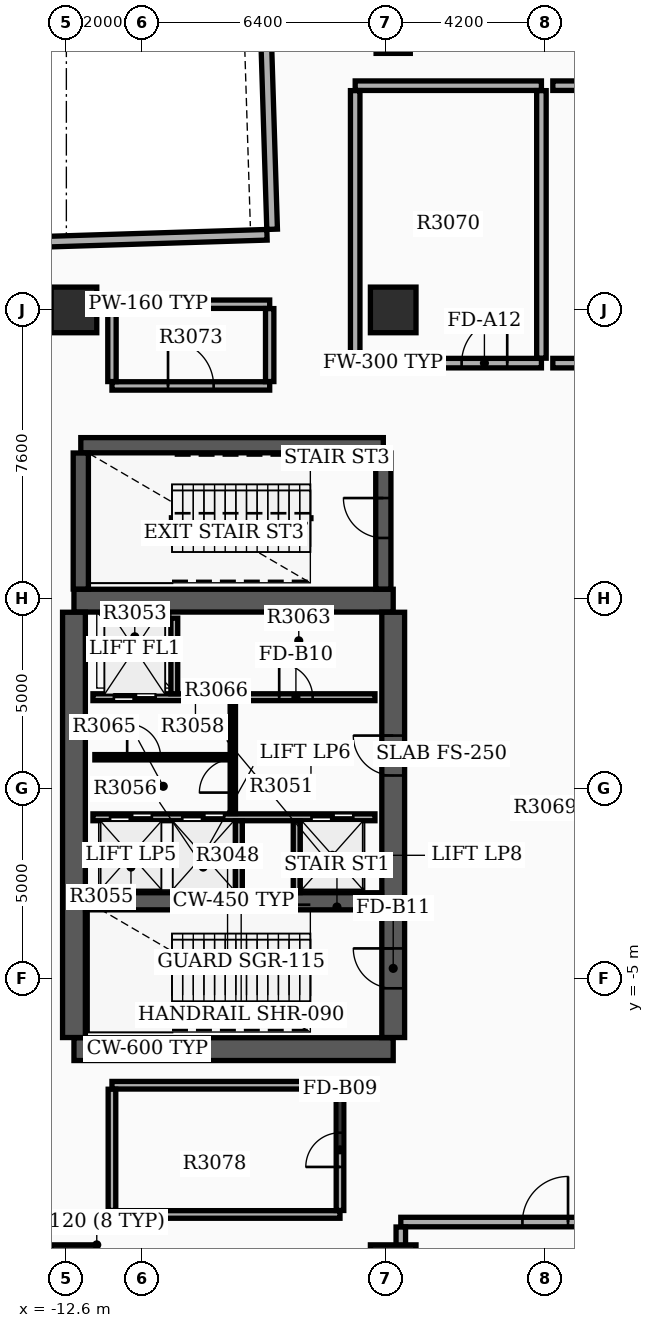
"""IFC4 building model, lengths in metres.
Left out: names, types, materials, properties, quantities, classifications, styles, units other than length and angle.
Written with IfcOpenShell. Run it as: python <this file> out.ifc"""

import sys

from ifc_helpers import new_model, si_unit, direction, frame, frame_2d, origin, origin_2d, place, context, subcontext, project, spatial, rectangle, extrude, element, fill, save


model = new_model("IFC4")
c1 = context("Model", 3, precision=1e-05, world=origin(), true_north=direction((0.0, 1.0)))
c2 = subcontext(c1, "Body", "Model", "MODEL_VIEW")
j1 = project(units=[si_unit("LENGTHUNIT", "METRE"), si_unit("PLANEANGLEUNIT", "RADIAN")], contexts=[c1])
p1 = place(None, origin())
s1 = spatial("IfcSite", under=j1, at=p1, CompositionType="ELEMENT")
p2 = place(p1, origin())
s2 = spatial("IfcBuilding", under=s1, at=p2, CompositionType="ELEMENT")
p3 = place(p2, frame((0.0, 0.0, 191.7)))
s3 = spatial("IfcBuildingStorey", under=s2, at=p3, CompositionType="ELEMENT", Elevation=191.7)
for number, where, z_axis, x_axis in (
    (1, (-12.4, -6.85, 0.0), (0.0, 0.0, 1.0), (1.0, 0.0, 0.0)),
    (2, (-12.4, 4.95, 0.0), (0.0, 0.0, 1.0), (1.0, 0.0, 0.0)),
):
    element("IfcWall", number, at=place(p3, frame(where, z_axis=z_axis, x_axis=x_axis)), inside=s3, PredefinedType="SHEAR", context=c2, shape_type="SweptSolid", body=[
        extrude(rectangle(XDim=8.4, YDim=0.6, at=frame_2d((4.2, 0.0))), origin(), (0.0, 0.0, 1.0), 4.85),
    ])
p4 = place(p3, frame((-12.4, -6.545, 0.0), z_axis=(0.0, 0.0, 1.0), x_axis=(0.0, 1.0, 0.0)))
e3 = element("IfcWall", 3, at=p4, inside=s3, PredefinedType="SHEAR", context=c2, shape_type="SweptSolid", body=[
    extrude(rectangle(XDim=11.19, YDim=0.6, at=frame_2d((5.595, 0.0))), origin(), (0.0, 0.0, 1.0), 4.85),
])
p5 = place(p3, frame((-4.0, -6.545, 0.0), z_axis=(0.0, 0.0, 1.0), x_axis=(0.0, 1.0, 0.0)))
e4 = element("IfcWall", 4, at=p5, inside=s3, PredefinedType="SHEAR", context=c2, shape_type="SweptSolid", body=[
    extrude(rectangle(XDim=11.19, YDim=0.6, at=frame_2d((5.595, 0.0))), origin(), (0.0, 0.0, 1.0), 4.85),
])
p6 = place(p5, frame((1.295, 0.0, 0.0)))
e5 = element("IfcOpeningElement", 5, at=p6, cuts=e4, PredefinedType="OPENING", context=c2, shape_type="SweptSolid", body=[
    extrude(rectangle(XDim=1.05, YDim=2.15, at=frame_2d((0.525, 1.075))), frame((0.0, 0.31, 0.0), z_axis=(0.0, -1.0, 0.0), x_axis=(1.0, 0.0, 0.0)), (0.0, 0.0, 1.0), 0.62),
])
p7 = place(p5, frame((6.895, 0.0, 0.0)))
e6 = element("IfcOpeningElement", 6, at=p7, cuts=e4, PredefinedType="OPENING", context=c2, shape_type="SweptSolid", body=[
    extrude(rectangle(XDim=1.05, YDim=2.15, at=frame_2d((0.525, 1.075))), frame((0.0, 0.31, 0.0), z_axis=(0.0, -1.0, 0.0), x_axis=(1.0, 0.0, 0.0)), (0.0, 0.0, 1.0), 0.62),
])
p8 = place(p3, frame((-12.095, -2.96, 0.0), z_axis=(0.0, 0.0, 1.0), x_axis=(1.0, 0.0, 0.0)))
e7 = element("IfcWall", 7, at=p8, inside=s3, PredefinedType="SHEAR", context=c2, shape_type="SweptSolid", body=[
    extrude(rectangle(XDim=7.79, YDim=0.45, at=frame_2d((3.895, 0.0))), origin(), (0.0, 0.0, 1.0), 4.85),
])
p9 = place(p3, frame((-12.22, 9.04, 0.0), z_axis=(0.0, 0.0, 1.0), x_axis=(1.0, 0.0, 0.0)))
e8 = element("IfcWall", 8, at=p9, inside=s3, PredefinedType="SHEAR", context=c2, shape_type="SweptSolid", body=[
    extrude(rectangle(XDim=7.96, YDim=0.4, at=frame_2d((3.98, 0.0))), origin(), (0.0, 0.0, 1.0), 4.85),
])
p10 = place(p3, frame((-12.22, 5.255, 0.0), z_axis=(0.0, 0.0, 1.0), x_axis=(0.0, 1.0, 0.0)))
e9 = element("IfcWall", 9, at=p10, inside=s3, PredefinedType="SHEAR", context=c2, shape_type="SweptSolid", body=[
    extrude(rectangle(XDim=3.58, YDim=0.4, at=frame_2d((1.79, 0.0))), origin(), (0.0, 0.0, 1.0), 4.85),
])
p11 = place(p3, frame((-4.26, 5.255, 0.0), z_axis=(0.0, 0.0, 1.0), x_axis=(0.0, 1.0, 0.0)))
e10 = element("IfcWall", 10, at=p11, inside=s3, PredefinedType="SHEAR", context=c2, shape_type="SweptSolid", body=[
    extrude(rectangle(XDim=3.58, YDim=0.4, at=frame_2d((1.79, 0.0))), origin(), (0.0, 0.0, 1.0), 4.85),
])
p12 = place(p11, frame((1.345, 0.0, 0.0)))
e11 = element("IfcOpeningElement", 11, at=p12, cuts=e10, PredefinedType="OPENING", context=c2, shape_type="SweptSolid", body=[
    extrude(rectangle(XDim=1.05, YDim=2.15, at=frame_2d((0.525, 1.075))), frame((0.0, 0.21, 0.0), z_axis=(0.0, -1.0, 0.0), x_axis=(1.0, 0.0, 0.0)), (0.0, 0.0, 1.0), 0.42),
])
for number, where, z_axis, x_axis in (
    (12, (-12.4, -12.6, 0.0), (0.0, 0.0, 1.0), (1.0, 0.0, 0.0)),
    (13, (-12.4, 12.6, 0.0), (0.0, 0.0, 1.0), (1.0, 0.0, 0.0)),
    (14, (-4.0, -12.6, 0.0), (0.0, 0.0, 1.0), (1.0, 0.0, 0.0)),
    (15, (-4.0, 12.6, 0.0), (0.0, 0.0, 1.0), (1.0, 0.0, 0.0)),
):
    element("IfcColumn", number, at=place(p3, frame(where, z_axis=z_axis, x_axis=x_axis)), inside=s3, PredefinedType="COLUMN", context=c2, shape_type="SweptSolid", body=[
        extrude(rectangle(XDim=1.2, YDim=1.2, at=origin_2d()), origin(), (0.0, 0.0, 1.0), 5.1),
    ])
p13 = place(p3, frame((-4.0, 19.8, 0.0), z_axis=(0.0, 0.0, 1.0), x_axis=(1.0, 0.0, 0.0)))
e16 = element("IfcColumn", 16, at=p13, inside=s3, PredefinedType="COLUMN", context=c2, shape_type="SweptSolid", body=[
    extrude(rectangle(XDim=0.9, YDim=0.9, at=origin_2d()), origin(), (0.0, 0.0, 1.0), 5.1),
])
p14 = place(p3, frame((-7.817, 34.812, 0.0), z_axis=(0.0, 0.0, 1.0), x_axis=(0.031410322165, -0.999506574096, 0.0)))
e17 = element("IfcWall", 17, at=p14, inside=s3, PredefinedType="STANDARD", context=c2, shape_type="SweptSolid", body=[
    extrude(rectangle(XDim=20.1, YDim=0.28, at=frame_2d((10.05, 0.0))), origin(), (0.0, 0.0, 1.0), 3.93),
])
p15 = place(p14, frame((0.85, 0.0, 0.95)))
e18 = element("IfcOpeningElement", 18, at=p15, cuts=e17, PredefinedType="OPENING", context=c2, shape_type="SweptSolid", body=[
    extrude(rectangle(XDim=1.1, YDim=1.2, at=frame_2d((0.55, 0.6))), frame((0.0, 0.15, 0.0), z_axis=(0.0, -1.0, 0.0), x_axis=(1.0, 0.0, 0.0)), (0.0, 0.0, 1.0), 0.3),
])
p16 = place(p3, frame((-13.618, 14.379, 0.0), z_axis=(0.0, 0.0, 1.0), x_axis=(0.999507224741, 0.031389611199, 0.0)))
e19 = element("IfcWall", 19, at=p16, inside=s3, PredefinedType="STANDARD", context=c2, shape_type="SweptSolid", body=[
    extrude(rectangle(XDim=6.3, YDim=0.28, at=frame_2d((3.15, 0.0))), origin(), (0.0, 0.0, 1.0), 3.93),
])
p17 = place(p3, frame((-11.9, 2.41, 0.0), z_axis=(0.0, 0.0, 1.0), x_axis=(1.0, 0.0, 0.0)))
e20 = element("IfcWall", 20, at=p17, inside=s3, PredefinedType="SOLIDWALL", context=c2, shape_type="SweptSolid", body=[
    extrude(rectangle(XDim=7.42, YDim=0.18, at=frame_2d((3.71, 0.0))), origin(), (0.0, 0.0, 1.0), 3.92),
])
p18 = place(p17, frame((0.55, 0.0, 0.0)))
e21 = element("IfcOpeningElement", 21, at=p18, cuts=e20, PredefinedType="OPENING", context=c2, shape_type="SweptSolid", body=[
    extrude(rectangle(XDim=1.1, YDim=2.15, at=frame_2d((0.55, 1.075))), frame((0.0, 0.1, 0.0), z_axis=(0.0, -1.0, 0.0), x_axis=(1.0, 0.0, 0.0)), (0.0, 0.0, 1.0), 0.2),
])
p19 = place(p17, frame((4.9, 0.0, 0.0)))
e22 = element("IfcOpeningElement", 22, at=p19, cuts=e20, PredefinedType="OPENING", context=c2, shape_type="SweptSolid", body=[
    extrude(rectangle(XDim=0.88, YDim=2.1, at=frame_2d((0.44, 1.05))), frame((0.0, 0.1, 0.0), z_axis=(0.0, -1.0, 0.0), x_axis=(1.0, 0.0, 0.0)), (0.0, 0.0, 1.0), 0.2),
])
p20 = place(p3, frame((-11.9, -0.75, 0.0), z_axis=(0.0, 0.0, 1.0), x_axis=(1.0, 0.0, 0.0)))
e23 = element("IfcWall", 23, at=p20, inside=s3, PredefinedType="SOLIDWALL", context=c2, shape_type="SweptSolid", body=[
    extrude(rectangle(XDim=7.42, YDim=0.18, at=frame_2d((3.71, 0.0))), origin(), (0.0, 0.0, 1.0), 3.92),
])
p21 = place(p20, frame((0.45, 0.0, 0.0)))
e24 = element("IfcOpeningElement", 24, at=p21, cuts=e23, PredefinedType="OPENING", context=c2, shape_type="SweptSolid", body=[
    extrude(rectangle(XDim=1.1, YDim=2.15, at=frame_2d((0.55, 1.075))), frame((0.0, 0.1, 0.0), z_axis=(0.0, -1.0, 0.0), x_axis=(1.0, 0.0, 0.0)), (0.0, 0.0, 1.0), 0.2),
])
p22 = place(p20, frame((2.35, 0.0, 0.0)))
e25 = element("IfcOpeningElement", 25, at=p22, cuts=e23, PredefinedType="OPENING", context=c2, shape_type="SweptSolid", body=[
    extrude(rectangle(XDim=1.1, YDim=2.15, at=frame_2d((0.55, 1.075))), frame((0.0, 0.1, 0.0), z_axis=(0.0, -1.0, 0.0), x_axis=(1.0, 0.0, 0.0)), (0.0, 0.0, 1.0), 0.2),
])
p23 = place(p20, frame((5.75, 0.0, 0.0)))
e26 = element("IfcOpeningElement", 26, at=p23, cuts=e23, PredefinedType="OPENING", context=c2, shape_type="SweptSolid", body=[
    extrude(rectangle(XDim=1.1, YDim=2.15, at=frame_2d((0.55, 1.075))), frame((0.0, 0.1, 0.0), z_axis=(0.0, -1.0, 0.0), x_axis=(1.0, 0.0, 0.0)), (0.0, 0.0, 1.0), 0.2),
])
p24 = place(p3, frame((-9.76, 2.5, 0.0), z_axis=(0.0, 0.0, 1.0), x_axis=(0.0, 1.0, 0.0)))
e27 = element("IfcWall", 27, at=p24, inside=s3, PredefinedType="SOLIDWALL", context=c2, shape_type="SweptSolid", body=[
    extrude(rectangle(XDim=1.99, YDim=0.18, at=frame_2d((0.995, 0.0))), origin(), (0.0, 0.0, 1.0), 3.92),
])
for number, where, z_axis, x_axis in (
    (28, (-8.06, -2.73, 0.0), (0.0, 0.0, 1.0), (0.0, 1.0, 0.0)),
    (29, (-6.54, -2.73, 0.0), (0.0, 0.0, 1.0), (0.0, 1.0, 0.0)),
):
    element("IfcWall", number, at=place(p3, frame(where, z_axis=z_axis, x_axis=x_axis)), inside=s3, PredefinedType="SOLIDWALL", context=c2, shape_type="SweptSolid", body=[
        extrude(rectangle(XDim=1.89, YDim=0.18, at=frame_2d((0.945, 0.0))), origin(), (0.0, 0.0, 1.0), 3.92),
    ])
p25 = place(p3, frame((-8.22, -0.65, 0.0), z_axis=(0.0, 0.0, 1.0), x_axis=(0.0, 1.0, 0.0)))
e30 = element("IfcWall", 30, at=p25, inside=s3, PredefinedType="SOLIDWALL", context=c2, shape_type="SweptSolid", body=[
    extrude(rectangle(XDim=2.96, YDim=0.14, at=frame_2d((1.48, 0.0))), origin(), (0.0, 0.0, 1.0), 3.92),
])
p26 = place(p25, frame((0.55, 0.0, 0.0)))
e31 = element("IfcOpeningElement", 31, at=p26, cuts=e30, PredefinedType="OPENING", context=c2, shape_type="SweptSolid", body=[
    extrude(rectangle(XDim=0.88, YDim=2.1, at=frame_2d((0.44, 1.05))), frame((0.0, 0.08, 0.0), z_axis=(0.0, -1.0, 0.0), x_axis=(1.0, 0.0, 0.0)), (0.0, 0.0, 1.0), 0.16),
])
p27 = place(p3, frame((-11.85, 0.83, 0.0), z_axis=(0.0, 0.0, 1.0), x_axis=(1.0, 0.0, 0.0)))
e32 = element("IfcWall", 32, at=p27, inside=s3, PredefinedType="PARTITIONING", context=c2, shape_type="SweptSolid", body=[
    extrude(rectangle(XDim=3.552, YDim=0.14, at=frame_2d((1.776, 0.0))), origin(), (0.0, 0.0, 1.0), 3.92),
])
p28 = place(p27, frame((0.85, 0.0, 0.0)))
e33 = element("IfcOpeningElement", 33, at=p28, cuts=e32, PredefinedType="OPENING", context=c2, shape_type="SweptSolid", body=[
    extrude(rectangle(XDim=0.88, YDim=2.1, at=frame_2d((0.44, 1.05))), frame((0.0, 0.08, 0.0), z_axis=(0.0, -1.0, 0.0), x_axis=(1.0, 0.0, 0.0)), (0.0, 0.0, 1.0), 0.16),
])
p29 = place(p3, frame((-5.0, 11.2, 0.0), z_axis=(0.0, 0.0, 1.0), x_axis=(1.0, 0.0, 0.0)))
e34 = element("IfcWall", 34, at=p29, inside=s3, PredefinedType="SOLIDWALL", context=c2, shape_type="SweptSolid", body=[
    extrude(rectangle(XDim=4.9, YDim=0.25, at=frame_2d((2.45, 0.0))), origin(), (0.0, 0.0, 1.0), 3.92),
])
p30 = place(p29, frame((2.8, 0.0, 0.0)))
e35 = element("IfcOpeningElement", 35, at=p30, cuts=e34, PredefinedType="OPENING", context=c2, shape_type="SweptSolid", body=[
    extrude(rectangle(XDim=1.2, YDim=2.15, at=frame_2d((0.6, 1.075))), frame((0.0, 0.135, 0.0), z_axis=(0.0, -1.0, 0.0), x_axis=(1.0, 0.0, 0.0)), (0.0, 0.0, 1.0), 0.27),
])
p31 = place(p3, frame((-5.0, 18.5, 0.0), z_axis=(0.0, 0.0, 1.0), x_axis=(1.0, 0.0, 0.0)))
e36 = element("IfcWall", 36, at=p31, inside=s3, PredefinedType="SOLIDWALL", context=c2, shape_type="SweptSolid", body=[
    extrude(rectangle(XDim=4.9, YDim=0.25, at=frame_2d((2.45, 0.0))), origin(), (0.0, 0.0, 1.0), 3.92),
])
for number, where, z_axis, x_axis in (
    (37, (-5.0, 11.33, 0.0), (0.0, 0.0, 1.0), (0.0, 1.0, 0.0)),
    (38, (-0.1, 11.33, 0.0), (0.0, 0.0, 1.0), (0.0, 1.0, 0.0)),
):
    element("IfcWall", number, at=place(p3, frame(where, z_axis=z_axis, x_axis=x_axis)), inside=s3, PredefinedType="SOLIDWALL", context=c2, shape_type="SweptSolid", body=[
        extrude(rectangle(XDim=7.04, YDim=0.25, at=frame_2d((3.52, 0.0))), origin(), (0.0, 0.0, 1.0), 3.92),
    ])
p32 = place(p3, frame((0.2, 11.2, 0.0), z_axis=(0.0, 0.0, 1.0), x_axis=(1.0, 0.0, 0.0)))
e39 = element("IfcWall", 39, at=p32, inside=s3, PredefinedType="SOLIDWALL", context=c2, shape_type="SweptSolid", body=[
    extrude(rectangle(XDim=4.8, YDim=0.25, at=frame_2d((2.4, 0.0))), origin(), (0.0, 0.0, 1.0), 3.92),
])
p33 = place(p32, frame((0.85, 0.0, 0.0)))
e40 = element("IfcOpeningElement", 40, at=p33, cuts=e39, PredefinedType="OPENING", context=c2, shape_type="SweptSolid", body=[
    extrude(rectangle(XDim=1.2, YDim=2.15, at=frame_2d((0.6, 1.075))), frame((0.0, 0.135, 0.0), z_axis=(0.0, -1.0, 0.0), x_axis=(1.0, 0.0, 0.0)), (0.0, 0.0, 1.0), 0.27),
])
p34 = place(p3, frame((0.2, 18.5, 0.0), z_axis=(0.0, 0.0, 1.0), x_axis=(1.0, 0.0, 0.0)))
e41 = element("IfcWall", 41, at=p34, inside=s3, PredefinedType="SOLIDWALL", context=c2, shape_type="SweptSolid", body=[
    extrude(rectangle(XDim=4.8, YDim=0.25, at=frame_2d((2.4, 0.0))), origin(), (0.0, 0.0, 1.0), 3.92),
])
p35 = place(p3, frame((-3.8, -11.4, 0.0), z_axis=(0.0, 0.0, 1.0), x_axis=(1.0, 0.0, 0.0)))
e42 = element("IfcWall", 42, at=p35, inside=s3, PredefinedType="SOLIDWALL", context=c2, shape_type="SweptSolid", body=[
    extrude(rectangle(XDim=7.6, YDim=0.25, at=frame_2d((3.8, 0.0))), origin(), (0.0, 0.0, 1.0), 3.92),
])
p36 = place(p35, frame((3.2, 0.0, 0.0)))
e43 = element("IfcOpeningElement", 43, at=p36, cuts=e42, PredefinedType="OPENING", context=c2, shape_type="SweptSolid", body=[
    extrude(rectangle(XDim=1.2, YDim=2.15, at=frame_2d((0.6, 1.075))), frame((0.0, 0.135, 0.0), z_axis=(0.0, -1.0, 0.0), x_axis=(1.0, 0.0, 0.0)), (0.0, 0.0, 1.0), 0.27),
])
p37 = place(p3, frame((-3.8, -18.47, 0.0), z_axis=(0.0, 0.0, 1.0), x_axis=(0.0, 1.0, 0.0)))
e44 = element("IfcWall", 44, at=p37, inside=s3, PredefinedType="SOLIDWALL", context=c2, shape_type="SweptSolid", body=[
    extrude(rectangle(XDim=6.94, YDim=0.25, at=frame_2d((3.47, 0.0))), origin(), (0.0, 0.0, 1.0), 3.92),
])
p38 = place(p3, frame((-11.4, 10.6, 0.0), z_axis=(0.0, 0.0, 1.0), x_axis=(1.0, 0.0, 0.0)))
e45 = element("IfcWall", 45, at=p38, inside=s3, PredefinedType="PARTITIONING", context=c2, shape_type="SweptSolid", body=[
    extrude(rectangle(XDim=4.15, YDim=0.22, at=frame_2d((2.075, 0.0))), origin(), (0.0, 0.0, 1.0), 3.92),
])
p39 = place(p38, frame((1.475, 0.0, 0.0)))
e46 = element("IfcOpeningElement", 46, at=p39, cuts=e45, PredefinedType="OPENING", context=c2, shape_type="SweptSolid", body=[
    extrude(rectangle(XDim=1.2, YDim=2.15, at=frame_2d((0.6, 1.075))), frame((0.0, 0.12, 0.0), z_axis=(0.0, -1.0, 0.0), x_axis=(1.0, 0.0, 0.0)), (0.0, 0.0, 1.0), 0.24),
])
p40 = place(p3, frame((-11.4, 12.75, 0.0), z_axis=(0.0, 0.0, 1.0), x_axis=(1.0, 0.0, 0.0)))
e47 = element("IfcWall", 47, at=p40, inside=s3, PredefinedType="PARTITIONING", context=c2, shape_type="SweptSolid", body=[
    extrude(rectangle(XDim=4.15, YDim=0.22, at=frame_2d((2.075, 0.0))), origin(), (0.0, 0.0, 1.0), 3.92),
])
for number, where, z_axis, x_axis in (
    (48, (-11.4, 10.715, 0.0), (0.0, 0.0, 1.0), (0.0, 1.0, 0.0)),
    (49, (-7.25, 10.715, 0.0), (0.0, 0.0, 1.0), (0.0, 1.0, 0.0)),
):
    element("IfcWall", number, at=place(p3, frame(where, z_axis=z_axis, x_axis=x_axis)), inside=s3, PredefinedType="PARTITIONING", context=c2, shape_type="SweptSolid", body=[
        extrude(rectangle(XDim=1.92, YDim=0.22, at=frame_2d((0.96, 0.0))), origin(), (0.0, 0.0, 1.0), 3.92),
    ])
for number, where, z_axis, x_axis in (
    (50, (-11.4, -11.2, 0.0), (0.0, 0.0, 1.0), (1.0, 0.0, 0.0)),
    (51, (-11.4, -7.8, 0.0), (0.0, 0.0, 1.0), (1.0, 0.0, 0.0)),
):
    element("IfcWall", number, at=place(p3, frame(where, z_axis=z_axis, x_axis=x_axis)), inside=s3, PredefinedType="PARTITIONING", context=c2, shape_type="SweptSolid", body=[
        extrude(rectangle(XDim=6.0, YDim=0.2, at=frame_2d((3.0, 0.0))), origin(), (0.0, 0.0, 1.0), 3.92),
    ])
p41 = place(p3, frame((-11.4, -11.095, 0.0), z_axis=(0.0, 0.0, 1.0), x_axis=(0.0, 1.0, 0.0)))
e52 = element("IfcWall", 52, at=p41, inside=s3, PredefinedType="PARTITIONING", context=c2, shape_type="SweptSolid", body=[
    extrude(rectangle(XDim=3.19, YDim=0.2, at=frame_2d((1.595, 0.0))), origin(), (0.0, 0.0, 1.0), 3.92),
])
p42 = place(p3, frame((-5.4, -11.095, 0.0), z_axis=(0.0, 0.0, 1.0), x_axis=(0.0, 1.0, 0.0)))
e53 = element("IfcWall", 53, at=p42, inside=s3, PredefinedType="PARTITIONING", context=c2, shape_type="SweptSolid", body=[
    extrude(rectangle(XDim=3.19, YDim=0.2, at=frame_2d((1.595, 0.0))), origin(), (0.0, 0.0, 1.0), 3.92),
])
p43 = place(p42, frame((1.145, 0.0, 0.0)))
e54 = element("IfcOpeningElement", 54, at=p43, cuts=e53, PredefinedType="OPENING", context=c2, shape_type="SweptSolid", body=[
    extrude(rectangle(XDim=0.9, YDim=2.15, at=frame_2d((0.45, 1.075))), frame((0.0, 0.11, 0.0), z_axis=(0.0, -1.0, 0.0), x_axis=(1.0, 0.0, 0.0)), (0.0, 0.0, 1.0), 0.22),
])
p44 = place(p6, origin())
e55 = element("IfcDoor", 55, at=p44, inside=s3, OperationType="SINGLE_SWING_RIGHT", PredefinedType="DOOR", context=c2, shape_type="SweptSolid", body=[
    extrude(rectangle(XDim=1.05, YDim=2.15, at=frame_2d((0.525, 1.075))), frame((0.0, 0.025, 0.0), z_axis=(0.0, -1.0, 0.0), x_axis=(1.0, 0.0, 0.0)), (0.0, 0.0, 1.0), 0.05),
])
fill(e5, e55)
p45 = place(p7, origin())
e56 = element("IfcDoor", 56, at=p45, inside=s3, OperationType="SINGLE_SWING_RIGHT", PredefinedType="DOOR", context=c2, shape_type="SweptSolid", body=[
    extrude(rectangle(XDim=1.05, YDim=2.15, at=frame_2d((0.525, 1.075))), frame((0.0, 0.025, 0.0), z_axis=(0.0, -1.0, 0.0), x_axis=(1.0, 0.0, 0.0)), (0.0, 0.0, 1.0), 0.05),
])
fill(e6, e56)
p46 = place(p12, origin())
e57 = element("IfcDoor", 57, at=p46, inside=s3, OperationType="SINGLE_SWING_RIGHT", PredefinedType="DOOR", context=c2, shape_type="SweptSolid", body=[
    extrude(rectangle(XDim=1.05, YDim=2.15, at=frame_2d((0.525, 1.075))), frame((0.0, 0.025, 0.0), z_axis=(0.0, -1.0, 0.0), x_axis=(1.0, 0.0, 0.0)), (0.0, 0.0, 1.0), 0.05),
])
fill(e11, e57)
p47 = place(p18, origin())
e58 = element("IfcDoor", 58, at=p47, inside=s3, OperationType="DOUBLE_DOOR_SLIDING", PredefinedType="DOOR", context=c2, shape_type="SweptSolid", body=[
    extrude(rectangle(XDim=1.1, YDim=2.15, at=frame_2d((0.55, 1.075))), frame((0.0, 0.025, 0.0), z_axis=(0.0, -1.0, 0.0), x_axis=(1.0, 0.0, 0.0)), (0.0, 0.0, 1.0), 0.05),
])
fill(e21, e58)
p48 = place(p21, origin())
e59 = element("IfcDoor", 59, at=p48, inside=s3, OperationType="DOUBLE_DOOR_SLIDING", PredefinedType="DOOR", context=c2, shape_type="SweptSolid", body=[
    extrude(rectangle(XDim=1.1, YDim=2.15, at=frame_2d((0.55, 1.075))), frame((0.0, 0.025, 0.0), z_axis=(0.0, -1.0, 0.0), x_axis=(1.0, 0.0, 0.0)), (0.0, 0.0, 1.0), 0.05),
])
fill(e24, e59)
p49 = place(p22, origin())
e60 = element("IfcDoor", 60, at=p49, inside=s3, OperationType="DOUBLE_DOOR_SLIDING", PredefinedType="DOOR", context=c2, shape_type="SweptSolid", body=[
    extrude(rectangle(XDim=1.1, YDim=2.15, at=frame_2d((0.55, 1.075))), frame((0.0, 0.025, 0.0), z_axis=(0.0, -1.0, 0.0), x_axis=(1.0, 0.0, 0.0)), (0.0, 0.0, 1.0), 0.05),
])
fill(e25, e60)
p50 = place(p23, origin())
e61 = element("IfcDoor", 61, at=p50, inside=s3, OperationType="DOUBLE_DOOR_SLIDING", PredefinedType="DOOR", context=c2, shape_type="SweptSolid", body=[
    extrude(rectangle(XDim=1.1, YDim=2.15, at=frame_2d((0.55, 1.075))), frame((0.0, 0.025, 0.0), z_axis=(0.0, -1.0, 0.0), x_axis=(1.0, 0.0, 0.0)), (0.0, 0.0, 1.0), 0.05),
])
fill(e26, e61)
p51 = place(p19, origin())
e62 = element("IfcDoor", 62, at=p51, inside=s3, OperationType="SINGLE_SWING_LEFT", PredefinedType="DOOR", context=c2, shape_type="SweptSolid", body=[
    extrude(rectangle(XDim=0.88, YDim=2.1, at=frame_2d((0.44, 1.05))), frame((0.0, 0.025, 0.0), z_axis=(0.0, -1.0, 0.0), x_axis=(1.0, 0.0, 0.0)), (0.0, 0.0, 1.0), 0.05),
])
fill(e22, e62)
p52 = place(p26, origin())
e63 = element("IfcDoor", 63, at=p52, inside=s3, OperationType="SINGLE_SWING_LEFT", PredefinedType="DOOR", context=c2, shape_type="SweptSolid", body=[
    extrude(rectangle(XDim=0.88, YDim=2.1, at=frame_2d((0.44, 1.05))), frame((0.0, 0.025, 0.0), z_axis=(0.0, -1.0, 0.0), x_axis=(1.0, 0.0, 0.0)), (0.0, 0.0, 1.0), 0.05),
])
fill(e31, e63)
p53 = place(p28, origin())
e64 = element("IfcDoor", 64, at=p53, inside=s3, OperationType="SINGLE_SWING_LEFT", PredefinedType="DOOR", context=c2, shape_type="SweptSolid", body=[
    extrude(rectangle(XDim=0.88, YDim=2.1, at=frame_2d((0.44, 1.05))), frame((0.0, 0.025, 0.0), z_axis=(0.0, -1.0, 0.0), x_axis=(1.0, 0.0, 0.0)), (0.0, 0.0, 1.0), 0.05),
])
fill(e33, e64)
p54 = place(p30, origin())
e65 = element("IfcDoor", 65, at=p54, inside=s3, OperationType="SINGLE_SWING_RIGHT", PredefinedType="DOOR", context=c2, shape_type="SweptSolid", body=[
    extrude(rectangle(XDim=1.2, YDim=2.15, at=frame_2d((0.6, 1.075))), frame((0.0, 0.025, 0.0), z_axis=(0.0, -1.0, 0.0), x_axis=(1.0, 0.0, 0.0)), (0.0, 0.0, 1.0), 0.05),
])
fill(e35, e65)
p55 = place(p36, origin())
e66 = element("IfcDoor", 66, at=p55, inside=s3, OperationType="SINGLE_SWING_RIGHT", PredefinedType="DOOR", context=c2, shape_type="SweptSolid", body=[
    extrude(rectangle(XDim=1.2, YDim=2.15, at=frame_2d((0.6, 1.075))), frame((0.0, 0.025, 0.0), z_axis=(0.0, -1.0, 0.0), x_axis=(1.0, 0.0, 0.0)), (0.0, 0.0, 1.0), 0.05),
])
fill(e43, e66)
p56 = place(p39, origin())
e67 = element("IfcDoor", 67, at=p56, inside=s3, OperationType="SINGLE_SWING_LEFT", PredefinedType="DOOR", context=c2, shape_type="SweptSolid", body=[
    extrude(rectangle(XDim=1.2, YDim=2.15, at=frame_2d((0.6, 1.075))), frame((0.0, 0.025, 0.0), z_axis=(0.0, -1.0, 0.0), x_axis=(1.0, 0.0, 0.0)), (0.0, 0.0, 1.0), 0.05),
])
fill(e46, e67)
p57 = place(p43, origin())
e68 = element("IfcDoor", 68, at=p57, inside=s3, OperationType="SINGLE_SWING_LEFT", PredefinedType="DOOR", context=c2, shape_type="SweptSolid", body=[
    extrude(rectangle(XDim=0.9, YDim=2.15, at=frame_2d((0.45, 1.075))), frame((0.0, 0.025, 0.0), z_axis=(0.0, -1.0, 0.0), x_axis=(1.0, 0.0, 0.0)), (0.0, 0.0, 1.0), 0.05),
])
fill(e54, e68)
save(model, sys.argv[1])
